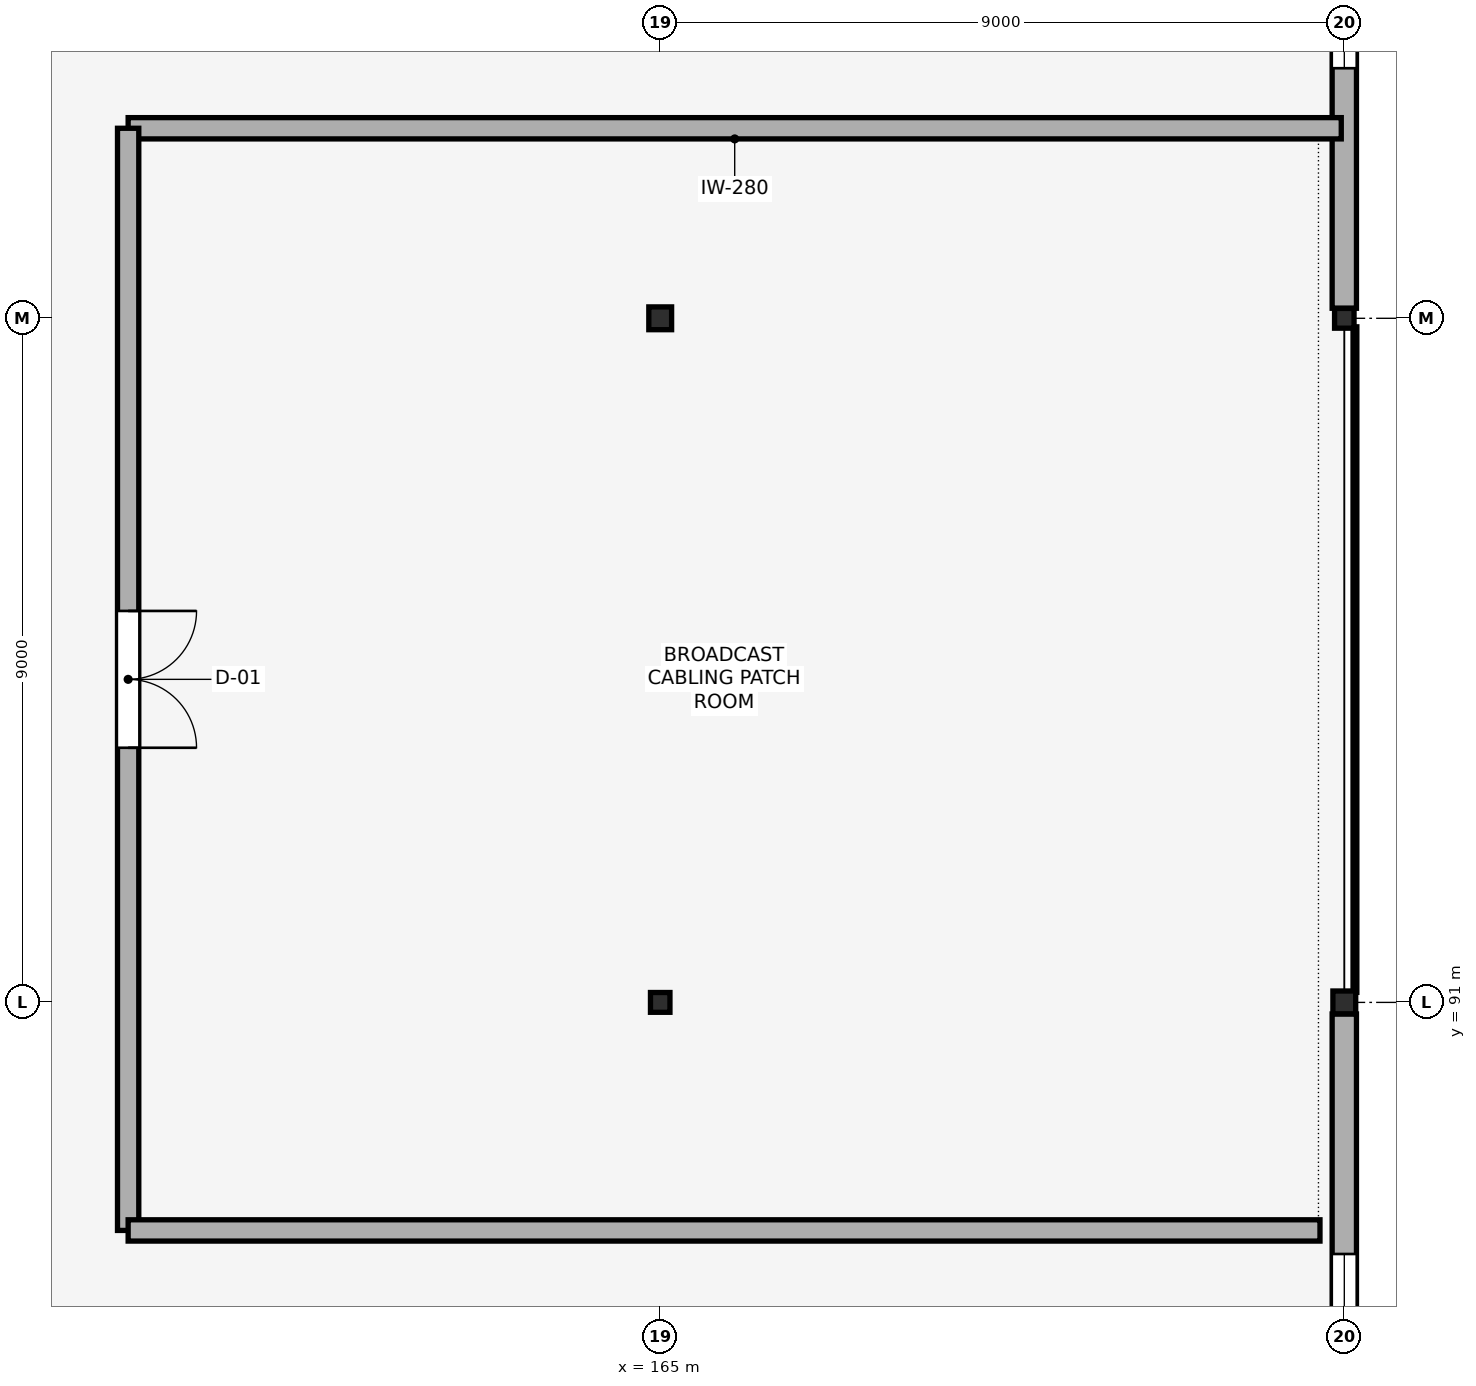
"""IFC4 building model, lengths in metres.
Left out: names, types, materials, properties, quantities, classifications, styles, units other than length and angle.
Written with IfcOpenShell. Run it as: python <this file> out.ifc"""

import sys

from ifc_helpers import new_model, si_unit, direction, frame, frame_2d, origin, origin_2d, place, context, subcontext, project, spatial, rectangle, hollow_rectangle, i_section, extrude, element, fill, save


model = new_model("IFC4")
c1 = context("Model", 3, precision=1e-05, world=origin(), true_north=direction((0.0, 1.0)))
c2 = subcontext(c1, "Body", "Model", "MODEL_VIEW")
j1 = project(units=[si_unit("LENGTHUNIT", "METRE"), si_unit("PLANEANGLEUNIT", "RADIAN")], contexts=[c1])
p1 = place(None, origin())
s1 = spatial("IfcSite", under=j1, at=p1, CompositionType="ELEMENT")
p2 = place(p1, origin())
s2 = spatial("IfcBuilding", under=s1, at=p2, CompositionType="ELEMENT")
p3 = place(p2, frame((0.0, 0.0, 5.4)))
s3 = spatial("IfcBuildingStorey", under=s2, at=p3, CompositionType="ELEMENT", Elevation=5.4)
p4 = place(p3, frame((165.0, 91.0, 0.0), z_axis=(0.0, 0.0, 1.0), x_axis=(1.0, 0.0, 0.0)))
e1 = element("IfcColumn", 1, at=p4, inside=s3, PredefinedType="COLUMN", context=c2, shape_type="SweptSolid", body=[
    extrude(i_section(OverallWidth=0.256, OverallDepth=0.26, WebThickness=0.01, FlangeThickness=0.017, FilletRadius=0.013, at=origin_2d()), origin(), (0.0, 0.0, 1.0), 4.8),
])
for number, where, z_axis, x_axis in (
    (2, (165.0, 100.0, 0.0), (0.0, 0.0, 1.0), (1.0, 0.0, 0.0)),
    (3, (174.0, 91.0, 0.0), (0.0, 0.0, 1.0), (1.0, 0.0, 0.0)),
):
    element("IfcColumn", number, at=place(p3, frame(where, z_axis=z_axis, x_axis=x_axis)), inside=s3, PredefinedType="COLUMN", context=c2, shape_type="SweptSolid", body=[
        extrude(hollow_rectangle(XDim=0.3, YDim=0.3, WallThickness=0.012, at=origin_2d()), origin(), (0.0, 0.0, 1.0), 4.8),
    ])
p5 = place(p3, frame((174.0, 100.0, 0.0), z_axis=(0.0, 0.0, 1.0), x_axis=(1.0, 0.0, 0.0)))
e4 = element("IfcColumn", 4, at=p5, inside=s3, PredefinedType="COLUMN", context=c2, shape_type="SweptSolid", body=[
    extrude(i_section(OverallWidth=0.256, OverallDepth=0.26, WebThickness=0.01, FlangeThickness=0.017, FilletRadius=0.013, at=origin_2d()), origin(), (0.0, 0.0, 1.0), 4.8),
])
p6 = place(p3, frame((174.0, 108.848, 0.0), z_axis=(0.0, 0.0, 1.0), x_axis=(0.0, -1.0, 0.0)))
e5 = element("IfcWall", 5, at=p6, inside=s3, PredefinedType="STANDARD", context=c2, shape_type="SweptSolid", body=[
    extrude(rectangle(XDim=8.716, YDim=0.32, at=frame_2d((4.358, 0.0))), origin(), (0.0, 0.0, 1.0), 4.215),
])
p7 = place(p6, frame((3.158, 0.0, 1.15)))
e6 = element("IfcOpeningElement", 6, at=p7, cuts=e5, PredefinedType="OPENING", context=c2, shape_type="SweptSolid", body=[
    extrude(rectangle(XDim=2.4, YDim=1.4, at=frame_2d((1.2, 0.7))), frame((0.0, 0.17, 0.0), z_axis=(0.0, -1.0, 0.0), x_axis=(1.0, 0.0, 0.0)), (0.0, 0.0, 1.0), 0.34),
])
p8 = place(p3, frame((174.0, 90.848, 0.0), z_axis=(0.0, 0.0, 1.0), x_axis=(0.0, -1.0, 0.0)))
e7 = element("IfcWall", 7, at=p8, inside=s3, PredefinedType="STANDARD", context=c2, shape_type="SweptSolid", body=[
    extrude(rectangle(XDim=8.716, YDim=0.32, at=frame_2d((4.358, 0.0))), origin(), (0.0, 0.0, 1.0), 4.215),
])
p9 = place(p8, frame((3.158, 0.0, 1.15)))
e8 = element("IfcOpeningElement", 8, at=p9, cuts=e7, PredefinedType="OPENING", context=c2, shape_type="SweptSolid", body=[
    extrude(rectangle(XDim=2.4, YDim=1.4, at=frame_2d((1.2, 0.7))), frame((0.0, 0.17, 0.0), z_axis=(0.0, -1.0, 0.0), x_axis=(1.0, 0.0, 0.0)), (0.0, 0.0, 1.0), 0.34),
])
p10 = place(p3, frame((173.96, 102.5, 0.0), z_axis=(0.0, 0.0, 1.0), x_axis=(-1.0, 0.0, 0.0)))
e9 = element("IfcWall", 9, at=p10, inside=s3, PredefinedType="PARTITIONING", context=c2, shape_type="SweptSolid", body=[
    extrude(rectangle(XDim=15.96, YDim=0.28, at=frame_2d((7.98, 0.0))), origin(), (0.0, 0.0, 1.0), 4.52),
])
p11 = place(p3, frame((158.0, 102.5, 0.0), z_axis=(0.0, 0.0, 1.0), x_axis=(0.0, -1.0, 0.0)))
e10 = element("IfcWall", 10, at=p11, inside=s3, PredefinedType="PARTITIONING", context=c2, shape_type="SweptSolid", body=[
    extrude(rectangle(XDim=14.5, YDim=0.28, at=frame_2d((7.25, 0.0))), origin(), (0.0, 0.0, 1.0), 4.52),
])
p12 = place(p11, frame((6.35, 0.0, 0.0)))
e11 = element("IfcOpeningElement", 11, at=p12, cuts=e10, PredefinedType="OPENING", context=c2, shape_type="SweptSolid", body=[
    extrude(rectangle(XDim=1.8, YDim=2.2, at=frame_2d((0.9, 1.1))), frame((0.0, 0.15, 0.0), z_axis=(0.0, -1.0, 0.0), x_axis=(1.0, 0.0, 0.0)), (0.0, 0.0, 1.0), 0.3),
])
p13 = place(p3, frame((158.0, 88.0, 0.0), z_axis=(0.0, 0.0, 1.0), x_axis=(1.0, 0.0, 0.0)))
e12 = element("IfcWall", 12, at=p13, inside=s3, PredefinedType="PARTITIONING", context=c2, shape_type="SweptSolid", body=[
    extrude(rectangle(XDim=15.68, YDim=0.28, at=frame_2d((7.84, 0.0))), origin(), (0.0, 0.0, 1.0), 4.109),
])
p14 = place(p7, origin())
e13 = element("IfcWindow", 13, at=p14, inside=s3, PartitioningType="SINGLE_PANEL", PredefinedType="WINDOW", context=c2, shape_type="SweptSolid", body=[
    extrude(rectangle(XDim=2.4, YDim=1.4, at=frame_2d((1.2, 0.7))), frame((0.0, 0.03, 0.0), z_axis=(0.0, -1.0, 0.0), x_axis=(1.0, 0.0, 0.0)), (0.0, 0.0, 1.0), 0.06),
])
fill(e6, e13)
p15 = place(p9, origin())
e14 = element("IfcWindow", 14, at=p15, inside=s3, PartitioningType="SINGLE_PANEL", PredefinedType="WINDOW", context=c2, shape_type="SweptSolid", body=[
    extrude(rectangle(XDim=2.4, YDim=1.4, at=frame_2d((1.2, 0.7))), frame((0.0, 0.03, 0.0), z_axis=(0.0, -1.0, 0.0), x_axis=(1.0, 0.0, 0.0)), (0.0, 0.0, 1.0), 0.06),
])
fill(e8, e14)
p16 = place(p12, origin())
e15 = element("IfcDoor", 15, at=p16, inside=s3, OperationType="DOUBLE_DOOR_SINGLE_SWING", PredefinedType="DOOR", context=c2, shape_type="SweptSolid", body=[
    extrude(rectangle(XDim=1.8, YDim=2.2, at=frame_2d((0.9, 1.1))), frame((0.0, 0.025, 0.0), z_axis=(0.0, -1.0, 0.0), x_axis=(1.0, 0.0, 0.0)), (0.0, 0.0, 1.0), 0.05),
])
fill(e11, e15)
save(model, sys.argv[1])
